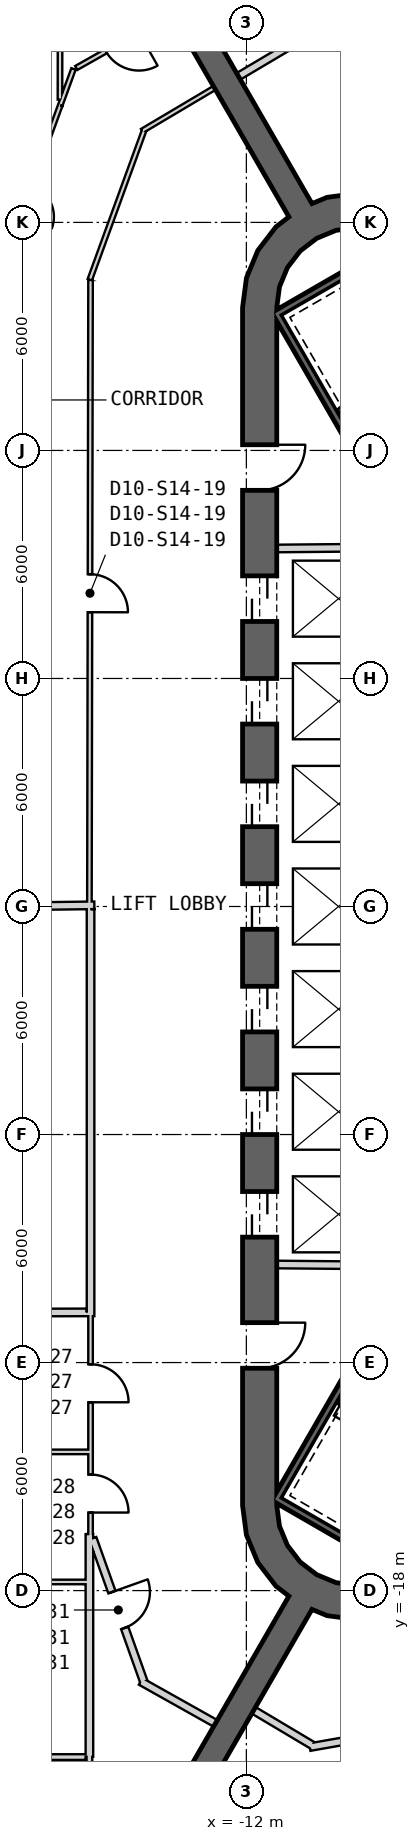
"""IFC4 building model, lengths in metres.
Left out: names, types, materials, properties, quantities, classifications, styles, units other than length and angle.
Written with IfcOpenShell. Run it as: python <this file> out.ifc"""

import sys

from ifc_helpers import new_model, si_unit, direction, frame, frame_2d, origin, place, context, subcontext, project, spatial, polyline, rectangle, outline, extrude, element, fill, save


model = new_model("IFC4")
c1 = context("Model", 3, precision=1e-05, world=origin(), true_north=direction((0.0, 1.0)))
c2 = subcontext(c1, "Body", "Model", "MODEL_VIEW")
j1 = project(units=[si_unit("LENGTHUNIT", "METRE"), si_unit("PLANEANGLEUNIT", "RADIAN")], contexts=[c1])
p1 = place(None, origin())
s1 = spatial("IfcSite", under=j1, at=p1, CompositionType="ELEMENT")
p2 = place(p1, origin())
s2 = spatial("IfcBuilding", under=s1, at=p2, CompositionType="ELEMENT")
p3 = place(p2, frame((0.0, 0.0, 229.2)))
s3 = spatial("IfcBuildingStorey", under=s2, at=p3, CompositionType="ELEMENT", Elevation=229.2)
p4 = place(p3, frame((-11.65, 15.762, 0.0), z_axis=(0.0, 0.0, 1.0), x_axis=(0.0, -1.0, 0.0)))
e1 = element("IfcWall", 1, at=p4, inside=s3, PredefinedType="SHEAR", context=c2, shape_type="SweptSolid", body=[
    extrude(rectangle(XDim=31.523, YDim=0.9, at=frame_2d((15.762, 0.0))), origin(), (0.0, 0.0, 1.0), 4.0),
])
p5 = place(p4, frame((7.062, 0.0, 0.0)))
e2 = element("IfcOpeningElement", 2, at=p5, cuts=e1, PredefinedType="OPENING", context=c2, shape_type="SweptSolid", body=[
    extrude(rectangle(XDim=1.2, YDim=2.4, at=frame_2d((0.6, 1.2))), frame((0.0, 0.46, 0.0), z_axis=(0.0, -1.0, 0.0), x_axis=(1.0, 0.0, 0.0)), (0.0, 0.0, 1.0), 0.92),
])
p6 = place(p4, frame((9.762, 0.0, 0.0)))
e3 = element("IfcOpeningElement", 3, at=p6, cuts=e1, PredefinedType="OPENING", context=c2, shape_type="SweptSolid", body=[
    extrude(rectangle(XDim=1.2, YDim=2.4, at=frame_2d((0.6, 1.2))), frame((0.0, 0.46, 0.0), z_axis=(0.0, -1.0, 0.0), x_axis=(1.0, 0.0, 0.0)), (0.0, 0.0, 1.0), 0.92),
])
p7 = place(p4, frame((12.462, 0.0, 0.0)))
e4 = element("IfcOpeningElement", 4, at=p7, cuts=e1, PredefinedType="OPENING", context=c2, shape_type="SweptSolid", body=[
    extrude(rectangle(XDim=1.2, YDim=2.4, at=frame_2d((0.6, 1.2))), frame((0.0, 0.46, 0.0), z_axis=(0.0, -1.0, 0.0), x_axis=(1.0, 0.0, 0.0)), (0.0, 0.0, 1.0), 0.92),
])
p8 = place(p4, frame((15.162, 0.0, 0.0)))
e5 = element("IfcOpeningElement", 5, at=p8, cuts=e1, PredefinedType="OPENING", context=c2, shape_type="SweptSolid", body=[
    extrude(rectangle(XDim=1.2, YDim=2.4, at=frame_2d((0.6, 1.2))), frame((0.0, 0.46, 0.0), z_axis=(0.0, -1.0, 0.0), x_axis=(1.0, 0.0, 0.0)), (0.0, 0.0, 1.0), 0.92),
])
p9 = place(p4, frame((17.862, 0.0, 0.0)))
e6 = element("IfcOpeningElement", 6, at=p9, cuts=e1, PredefinedType="OPENING", context=c2, shape_type="SweptSolid", body=[
    extrude(rectangle(XDim=1.2, YDim=2.4, at=frame_2d((0.6, 1.2))), frame((0.0, 0.46, 0.0), z_axis=(0.0, -1.0, 0.0), x_axis=(1.0, 0.0, 0.0)), (0.0, 0.0, 1.0), 0.92),
])
p10 = place(p4, frame((20.562, 0.0, 0.0)))
e7 = element("IfcOpeningElement", 7, at=p10, cuts=e1, PredefinedType="OPENING", context=c2, shape_type="SweptSolid", body=[
    extrude(rectangle(XDim=1.2, YDim=2.4, at=frame_2d((0.6, 1.2))), frame((0.0, 0.46, 0.0), z_axis=(0.0, -1.0, 0.0), x_axis=(1.0, 0.0, 0.0)), (0.0, 0.0, 1.0), 0.92),
])
p11 = place(p4, frame((23.262, 0.0, 0.0)))
e8 = element("IfcOpeningElement", 8, at=p11, cuts=e1, PredefinedType="OPENING", context=c2, shape_type="SweptSolid", body=[
    extrude(rectangle(XDim=1.2, YDim=2.4, at=frame_2d((0.6, 1.2))), frame((0.0, 0.46, 0.0), z_axis=(0.0, -1.0, 0.0), x_axis=(1.0, 0.0, 0.0)), (0.0, 0.0, 1.0), 0.92),
])
p12 = place(p4, frame((3.612, 0.0, 0.0)))
e9 = element("IfcOpeningElement", 9, at=p12, cuts=e1, PredefinedType="OPENING", context=c2, shape_type="SweptSolid", body=[
    extrude(rectangle(XDim=1.2, YDim=2.4, at=frame_2d((0.6, 1.2))), frame((0.0, 0.46, 0.0), z_axis=(0.0, -1.0, 0.0), x_axis=(1.0, 0.0, 0.0)), (0.0, 0.0, 1.0), 0.92),
])
p13 = place(p4, frame((26.712, 0.0, 0.0)))
e10 = element("IfcOpeningElement", 10, at=p13, cuts=e1, PredefinedType="OPENING", context=c2, shape_type="SweptSolid", body=[
    extrude(rectangle(XDim=1.2, YDim=2.4, at=frame_2d((0.6, 1.2))), frame((0.0, 0.46, 0.0), z_axis=(0.0, -1.0, 0.0), x_axis=(1.0, 0.0, 0.0)), (0.0, 0.0, 1.0), 0.92),
])
p14 = place(p3, origin())
e11 = element("IfcWall", 11, at=p14, inside=s3, PredefinedType="SHEAR", context=c2, shape_type="SweptSolid", body=[
    extrude(outline(polyline([(-7.6, 18.36), (-8.323, 18.659), (-9.1, 18.762), (-9.876, 18.659), (-10.6, 18.36), (-11.221, 17.883), (-11.698, 17.262), (-11.998, 16.538), (-12.1, 15.762), (-11.2, 15.762), (-11.128, 16.305), (-10.919, 16.812), (-10.585, 17.247), (-10.15, 17.58), (-9.644, 17.79), (-9.1, 17.862), (-8.556, 17.79), (-8.05, 17.58), (-7.6, 18.36)])), origin(), (0.0, 0.0, 1.0), 4.0),
])
p15 = place(p3, origin())
e12 = element("IfcWall", 12, at=p15, inside=s3, PredefinedType="SHEAR", context=c2, shape_type="SweptSolid", body=[
    extrude(outline(polyline([(-12.1, -15.762), (-11.998, -16.538), (-11.698, -17.262), (-11.221, -17.883), (-10.6, -18.36), (-9.876, -18.659), (-9.1, -18.762), (-8.323, -18.659), (-7.6, -18.36), (-8.05, -17.58), (-8.556, -17.79), (-9.1, -17.862), (-9.644, -17.79), (-10.15, -17.58), (-10.585, -17.247), (-10.919, -16.812), (-11.128, -16.305), (-11.2, -15.762), (-12.1, -15.762)])), origin(), (0.0, 0.0, 1.0), 4.0),
])
for number, where, z_axis, x_axis in (
    (13, (-10.575, 18.316, 0.0), (0.0, 0.0, 1.0), (-0.5, 0.866, 0.0)),
    (14, (-10.575, -18.316, 0.0), (0.0, 0.0, 1.0), (-0.5, -0.866, 0.0)),
):
    element("IfcWall", number, at=place(p3, frame(where, z_axis=z_axis, x_axis=x_axis)), inside=s3, PredefinedType="SHEAR", context=c2, shape_type="SweptSolid", body=[
        extrude(rectangle(XDim=11.368, YDim=0.7, at=frame_2d((5.684, 0.0))), origin(), (0.0, 0.0, 1.0), 4.0),
    ])
p16 = place(p3, frame((-11.2, 9.42, 0.0), z_axis=(0.0, 0.0, 1.0), x_axis=(0.999957167047, 0.009255488683, 0.0)))
e15 = element("IfcWall", 15, at=p16, inside=s3, PredefinedType="PLUMBINGWALL", context=c2, shape_type="SweptSolid", body=[
    extrude(rectangle(XDim=3.35, YDim=0.2, at=frame_2d((1.675, 0.0))), origin(), (0.0, 0.0, 1.0), 3.7),
])
p17 = place(p3, frame((-8.05, -9.449, 0.0), z_axis=(0.0, 0.0, 1.0), x_axis=(-0.999957467379, 0.009222983926, 0.0)))
e16 = element("IfcWall", 16, at=p17, inside=s3, PredefinedType="PLUMBINGWALL", context=c2, shape_type="SweptSolid", body=[
    extrude(rectangle(XDim=3.15, YDim=0.2, at=frame_2d((1.575, 0.0))), origin(), (0.0, 0.0, 1.0), 3.7),
])
p18 = place(p3, frame((-11.245, 15.678, -0.3), z_axis=(0.0, 0.0, 1.0), x_axis=(0.499977274689, -0.866038523851, 0.0)))
e17 = element("IfcWall", 17, at=p18, inside=s3, PredefinedType="SHEAR", context=c2, shape_type="SweptSolid", body=[
    extrude(rectangle(XDim=8.1, YDim=0.2, at=frame_2d((4.05, 0.0))), origin(), (0.0, 0.0, 1.0), 4.0),
])
for number, where, z_axis, x_axis in (
    (18, (-7.818, 17.541, -0.3), (0.0, 0.0, 1.0), (-0.866, -0.5, 0.0)),
    (19, (-11.282, -15.541, -0.3), (0.0, 0.0, 1.0), (0.866, -0.5, 0.0)),
):
    element("IfcWall", number, at=place(p3, frame(where, z_axis=z_axis, x_axis=x_axis)), inside=s3, PredefinedType="SHEAR", context=c2, shape_type="SweptSolid", body=[
        extrude(rectangle(XDim=3.8, YDim=0.2, at=frame_2d((1.9, 0.0))), origin(), (0.0, 0.0, 1.0), 4.0),
    ])
p19 = place(p3, frame((-7.196, -8.663, -0.3), z_axis=(0.0, 0.0, 1.0), x_axis=(-0.499997992926, -0.866026562566, 0.0)))
e20 = element("IfcWall", 20, at=p19, inside=s3, PredefinedType="SHEAR", context=c2, shape_type="SweptSolid", body=[
    extrude(rectangle(XDim=7.9, YDim=0.2, at=frame_2d((3.95, 0.0))), origin(), (0.0, 0.0, 1.0), 4.0),
])
p20 = place(p3, frame((-12.839, 21.538, 0.0), z_axis=(0.0, 0.0, 1.0), x_axis=(-0.859953000024, -0.510373233771, 0.0)))
e21 = element("IfcWall", 21, at=p20, inside=s3, PredefinedType="PARTITIONING", context=c2, shape_type="SweptSolid", body=[
    extrude(rectangle(XDim=2.215, YDim=0.12, at=frame_2d((1.108, 0.0))), origin(), (0.0, 0.0, 1.0), 3.7),
])
p21 = place(p3, frame((-14.691, 20.419, 0.0), z_axis=(0.0, 0.0, 1.0), x_axis=(-0.342019678743, -0.93969278988, 0.0)))
e22 = element("IfcWall", 22, at=p21, inside=s3, PredefinedType="PARTITIONING", context=c2, shape_type="SweptSolid", body=[
    extrude(rectangle(XDim=4.181, YDim=0.12, at=frame_2d((2.09, 0.0))), origin(), (0.0, 0.0, 1.0), 2.78),
])
p22 = place(p3, frame((-16.1, 16.486, 0.0), z_axis=(0.0, 0.0, 1.0), x_axis=(-0.00180665503, -0.999998367997, 0.0)))
e23 = element("IfcWall", 23, at=p22, inside=s3, PredefinedType="PARTITIONING", context=c2, shape_type="SweptSolid", body=[
    extrude(rectangle(XDim=16.486, YDim=0.12, at=frame_2d((8.243, 0.0))), origin(), (0.0, 0.0, 1.0), 2.88),
])
p23 = place(p22, frame((7.743, 0.0, 0.0)))
e24 = element("IfcOpeningElement", 24, at=p23, cuts=e23, PredefinedType="OPENING", context=c2, shape_type="SweptSolid", body=[
    extrude(rectangle(XDim=1.0, YDim=2.1, at=frame_2d((0.5, 1.05))), frame((0.0, 0.07, 0.0), z_axis=(0.0, -1.0, 0.0), x_axis=(1.0, 0.0, 0.0)), (0.0, 0.0, 1.0), 0.14),
])
p24 = place(p3, frame((-16.1, -10.71, 0.0), z_axis=(0.0, 0.0, 1.0), x_axis=(0.0, -1.0, 0.0)))
e25 = element("IfcWall", 25, at=p24, inside=s3, PredefinedType="PARTITIONING", context=c2, shape_type="SweptSolid", body=[
    extrude(rectangle(XDim=5.803, YDim=0.12, at=frame_2d((2.901, 0.0))), origin(), (0.0, 0.0, 1.0), 2.88),
])
p25 = place(p24, frame((1.335, 0.0, 0.0)))
e26 = element("IfcOpeningElement", 26, at=p25, cuts=e25, PredefinedType="OPENING", context=c2, shape_type="SweptSolid", body=[
    extrude(rectangle(XDim=1.0, YDim=2.1, at=frame_2d((0.5, 1.05))), frame((0.0, 0.07, 0.0), z_axis=(0.0, -1.0, 0.0), x_axis=(1.0, 0.0, 0.0)), (0.0, 0.0, 1.0), 0.14),
])
p26 = place(p24, frame((4.237, 0.0, 0.0)))
e27 = element("IfcOpeningElement", 27, at=p26, cuts=e25, PredefinedType="OPENING", context=c2, shape_type="SweptSolid", body=[
    extrude(rectangle(XDim=1.0, YDim=2.1, at=frame_2d((0.5, 1.05))), frame((0.0, 0.07, 0.0), z_axis=(0.0, -1.0, 0.0), x_axis=(1.0, 0.0, 0.0)), (0.0, 0.0, 1.0), 0.14),
])
p27 = place(p3, frame((-18.5, -0.001, 0.0), z_axis=(0.0, 0.0, 1.0), x_axis=(0.999915662945, 0.012987185857, 0.0)))
e28 = element("IfcWall", 28, at=p27, inside=s3, PredefinedType="PARTITIONING", context=c2, shape_type="SweptSolid", body=[
    extrude(rectangle(XDim=2.5, YDim=0.2, at=frame_2d((1.25, 0.0))), origin(), (0.0, 0.0, 1.0), 3.07),
])
p28 = place(p3, frame((-16.549, 22.039, 0.0), z_axis=(0.0, 0.0, 1.0), x_axis=(-0.34206932631, -0.939674718186, 0.0)))
e29 = element("IfcWall", 29, at=p28, inside=s3, PredefinedType="PARTITIONING", context=c2, shape_type="SweptSolid", body=[
    extrude(rectangle(XDim=1.021, YDim=0.12, at=frame_2d((0.511, 0.0))), origin(), (0.0, 0.0, 1.0), 3.7),
])
p29 = place(p3, frame((-16.898, 21.079, 0.0), z_axis=(0.0, 0.0, 1.0), x_axis=(-0.341879433665, -0.939743822984, 0.0)))
e30 = element("IfcWall", 30, at=p29, inside=s3, PredefinedType="PARTITIONING", context=c2, shape_type="SweptSolid", body=[
    extrude(rectangle(XDim=1.006, YDim=0.12, at=frame_2d((0.503, 0.0))), origin(), (0.0, 0.0, 1.0), 2.78),
])
p30 = place(p3, frame((-13.963, 23.484, 0.0), z_axis=(0.0, 0.0, 1.0), x_axis=(-0.870462007122, -0.49223560838, 0.0)))
e31 = element("IfcWall", 31, at=p30, inside=s3, PredefinedType="PARTITIONING", context=c2, shape_type="SweptSolid", body=[
    extrude(rectangle(XDim=2.887, YDim=0.12, at=frame_2d((1.443, 0.0))), origin(), (0.0, 0.0, 1.0), 3.7),
])
p31 = place(p30, frame((0.993, 0.0, 0.0)))
e32 = element("IfcOpeningElement", 32, at=p31, cuts=e31, PredefinedType="OPENING", context=c2, shape_type="SweptSolid", body=[
    extrude(rectangle(XDim=1.0, YDim=2.1, at=frame_2d((0.5, 1.05))), frame((0.0, 0.07, 0.0), z_axis=(0.0, -1.0, 0.0), x_axis=(1.0, 0.0, 0.0)), (0.0, 0.0, 1.0), 0.14),
])
p32 = place(p3, frame((-14.781, -20.389, 0.0), z_axis=(0.0, 0.0, 1.0), x_axis=(0.871979734391, -0.489541972471, 0.0)))
e33 = element("IfcWall", 33, at=p32, inside=s3, PredefinedType="PARTITIONING", context=c2, shape_type="SweptSolid", body=[
    extrude(rectangle(XDim=2.257, YDim=0.2, at=frame_2d((1.128, 0.0))), origin(), (0.0, 0.0, 1.0), 3.7),
])
p33 = place(p3, frame((-16.042, -16.623, 0.0), z_axis=(0.0, 0.0, 1.0), x_axis=(0.335572111171, -0.942014521228, 0.0)))
e34 = element("IfcWall", 34, at=p33, inside=s3, PredefinedType="PARTITIONING", context=c2, shape_type="SweptSolid", body=[
    extrude(rectangle(XDim=4.007, YDim=0.2, at=frame_2d((2.004, 0.0))), origin(), (0.0, 0.0, 1.0), 2.78),
])
p34 = place(p33, frame((1.504, 0.0, 0.0)))
e35 = element("IfcOpeningElement", 35, at=p34, cuts=e34, PredefinedType="OPENING", context=c2, shape_type="SweptSolid", body=[
    extrude(rectangle(XDim=1.0, YDim=2.1, at=frame_2d((0.5, 1.05))), frame((0.0, 0.11, 0.0), z_axis=(0.0, -1.0, 0.0), x_axis=(1.0, 0.0, 0.0)), (0.0, 0.0, 1.0), 0.22),
])
p35 = place(p3, frame((-16.1, -0.07, 0.0), z_axis=(0.0, 0.0, 1.0), x_axis=(0.0, -1.0, 0.0)))
e36 = element("IfcWall", 36, at=p35, inside=s3, PredefinedType="PARTITIONING", context=c2, shape_type="SweptSolid", body=[
    extrude(rectangle(XDim=10.71, YDim=0.2, at=frame_2d((5.355, 0.0))), origin(), (0.0, 0.0, 1.0), 2.98),
])
p36 = place(p3, frame((-10.265, 22.996, 0.0), z_axis=(0.0, 0.0, 1.0), x_axis=(-0.859934823121, -0.510403859687, 0.0)))
e37 = element("IfcWall", 37, at=p36, inside=s3, PredefinedType="PARTITIONING", context=c2, shape_type="SweptSolid", body=[
    extrude(rectangle(XDim=2.258, YDim=0.2, at=frame_2d((1.129, 0.0))), origin(), (0.0, 0.0, 1.0), 3.7),
])
p37 = place(p3, frame((-6.181, 22.199, 0.0), z_axis=(0.0, 0.0, 1.0), x_axis=(-0.984807544765, 0.17364935869, 0.0)))
e38 = element("IfcWall", 38, at=p37, inside=s3, PredefinedType="PARTITIONING", context=c2, shape_type="SweptSolid", body=[
    extrude(rectangle(XDim=4.199, YDim=0.2, at=frame_2d((2.1, 0.0))), origin(), (0.0, 0.0, 1.0), 2.78),
])
p38 = place(p3, frame((-10.332, -22.118, 0.0), z_axis=(0.0, 0.0, 1.0), x_axis=(0.984805281118, 0.173662195893, 0.0)))
e39 = element("IfcWall", 39, at=p38, inside=s3, PredefinedType="PARTITIONING", context=c2, shape_type="SweptSolid", body=[
    extrude(rectangle(XDim=3.732, YDim=0.2, at=frame_2d((1.866, 0.0))), origin(), (0.0, 0.0, 1.0), 2.78),
])
p39 = place(p3, frame((-11.807, -21.151, 0.0), z_axis=(0.0, 0.0, 1.0), x_axis=(0.859102811579, -0.511803047214, 0.0)))
e40 = element("IfcWall", 40, at=p39, inside=s3, PredefinedType="PARTITIONING", context=c2, shape_type="SweptSolid", body=[
    extrude(rectangle(XDim=1.802, YDim=0.2, at=frame_2d((0.901, 0.0))), origin(), (0.0, 0.0, 1.0), 3.7),
])
p40 = place(p3, frame((-28.654, -10.711, 0.0), z_axis=(0.0, 0.0, 1.0), x_axis=(0.999996949666, 0.002469951104, 0.0)))
e41 = element("IfcWall", 41, at=p40, inside=s3, PredefinedType="PARTITIONING", context=c2, shape_type="SweptSolid", body=[
    extrude(rectangle(XDim=12.454, YDim=0.2, at=frame_2d((6.227, 0.0))), origin(), (0.0, 0.0, 1.0), 2.98),
])
p41 = place(p3, frame((-16.13, -22.373, 0.0), z_axis=(0.0, 0.0, 1.0), x_axis=(0.0, 1.0, 0.0)))
e42 = element("IfcWall", 42, at=p41, inside=s3, PredefinedType="PARTITIONING", context=c2, shape_type="SweptSolid", body=[
    extrude(rectangle(XDim=4.6, YDim=0.2, at=frame_2d((2.3, 0.0))), origin(), (0.0, 0.0, 1.0), 2.78),
])
p42 = place(p3, frame((-16.13, -17.773, 0.0), z_axis=(0.0, 0.0, 1.0), x_axis=(0.0, 1.0, 0.0)))
e43 = element("IfcWall", 43, at=p42, inside=s3, PredefinedType="PARTITIONING", context=c2, shape_type="SweptSolid", body=[
    extrude(rectangle(XDim=1.26, YDim=0.2, at=frame_2d((0.63, 0.0))), origin(), (0.0, 0.0, 1.0), 3.7),
])
p43 = place(p3, frame((-16.13, -25.745, 0.0), z_axis=(0.0, 0.0, 1.0), x_axis=(0.0, 1.0, 0.0)))
e44 = element("IfcWall", 44, at=p43, inside=s3, PredefinedType="PLUMBINGWALL", context=c2, shape_type="SweptSolid", body=[
    extrude(rectangle(XDim=3.372, YDim=0.15, at=frame_2d((1.686, 0.0))), origin(), (0.0, 0.0, 1.0), 3.7),
])
p44 = place(p3, frame((-16.905, 21.23, 0.0), z_axis=(0.0, 0.0, 1.0), x_axis=(0.001474466813, 0.999998912973, 0.0)))
e45 = element("IfcWall", 45, at=p44, inside=s3, PredefinedType="PARTITIONING", context=c2, shape_type="SweptSolid", body=[
    extrude(rectangle(XDim=3.146, YDim=0.12, at=frame_2d((1.573, 0.0))), origin(), (0.0, 0.0, 1.0), 3.7),
])
p45 = place(p3, frame((-23.59, -14.351, 0.0), z_axis=(0.0, 0.0, 1.0), x_axis=(1.0, 0.0, 0.0)))
e46 = element("IfcWall", 46, at=p45, inside=s3, PredefinedType="PARTITIONING", context=c2, shape_type="SweptSolid", body=[
    extrude(rectangle(XDim=7.46, YDim=0.12, at=frame_2d((3.73, 0.0))), origin(), (0.0, 0.0, 1.0), 3.7),
])
p46 = place(p3, frame((-16.23, -17.773, 0.0), z_axis=(0.0, 0.0, 1.0), x_axis=(-1.0, 0.0, 0.0)))
e47 = element("IfcWall", 47, at=p46, inside=s3, PredefinedType="PARTITIONING", context=c2, shape_type="SweptSolid", body=[
    extrude(rectangle(XDim=7.36, YDim=0.12, at=frame_2d((3.68, 0.0))), origin(), (0.0, 0.0, 1.0), 2.88),
])
p47 = place(p3, frame((-23.59, -22.38, 0.0), z_axis=(0.0, 0.0, 1.0), x_axis=(1.0, 0.0, 0.0)))
e48 = element("IfcWall", 48, at=p47, inside=s3, PredefinedType="PLUMBINGWALL", context=c2, shape_type="SweptSolid", body=[
    extrude(rectangle(XDim=7.36, YDim=0.15, at=frame_2d((3.68, 0.0))), origin(), (0.0, 0.0, 1.0), 2.78),
])
p48 = place(p23, origin())
e49 = element("IfcDoor", 49, at=p48, inside=s3, OperationType="SINGLE_SWING_RIGHT", PredefinedType="NOTDEFINED", context=c2, shape_type="SweptSolid", body=[
    extrude(rectangle(XDim=1.0, YDim=2.1, at=frame_2d((0.5, 1.05))), frame((0.0, 0.025, 0.0), z_axis=(0.0, -1.0, 0.0), x_axis=(1.0, 0.0, 0.0)), (0.0, 0.0, 1.0), 0.05),
])
fill(e24, e49)
p49 = place(p31, origin())
e50 = element("IfcDoor", 50, at=p49, inside=s3, OperationType="SINGLE_SWING_LEFT", PredefinedType="NOTDEFINED", context=c2, shape_type="SweptSolid", body=[
    extrude(rectangle(XDim=1.0, YDim=2.1, at=frame_2d((0.5, 1.05))), frame((0.0, 0.025, 0.0), z_axis=(0.0, -1.0, 0.0), x_axis=(1.0, 0.0, 0.0)), (0.0, 0.0, 1.0), 0.05),
])
fill(e32, e50)
p50 = place(p25, origin())
e51 = element("IfcDoor", 51, at=p50, inside=s3, OperationType="SINGLE_SWING_LEFT", PredefinedType="NOTDEFINED", context=c2, shape_type="SweptSolid", body=[
    extrude(rectangle(XDim=1.0, YDim=2.1, at=frame_2d((0.5, 1.05))), frame((0.0, 0.025, 0.0), z_axis=(0.0, -1.0, 0.0), x_axis=(1.0, 0.0, 0.0)), (0.0, 0.0, 1.0), 0.05),
])
fill(e26, e51)
p51 = place(p26, origin())
e52 = element("IfcDoor", 52, at=p51, inside=s3, OperationType="SINGLE_SWING_RIGHT", PredefinedType="NOTDEFINED", context=c2, shape_type="SweptSolid", body=[
    extrude(rectangle(XDim=1.0, YDim=2.1, at=frame_2d((0.5, 1.05))), frame((0.0, 0.025, 0.0), z_axis=(0.0, -1.0, 0.0), x_axis=(1.0, 0.0, 0.0)), (0.0, 0.0, 1.0), 0.05),
])
fill(e27, e52)
p52 = place(p34, origin())
e53 = element("IfcDoor", 53, at=p52, inside=s3, OperationType="SINGLE_SWING_LEFT", PredefinedType="USERDEFINED", context=c2, shape_type="SweptSolid", body=[
    extrude(rectangle(XDim=1.0, YDim=2.1, at=frame_2d((0.5, 1.05))), frame((0.0, 0.025, 0.0), z_axis=(0.0, -1.0, 0.0), x_axis=(1.0, 0.0, 0.0)), (0.0, 0.0, 1.0), 0.05),
])
fill(e35, e53)
p53 = place(p5, origin())
e54 = element("IfcDoor", 54, at=p53, inside=s3, OperationType="SLIDING_TO_LEFT", PredefinedType="USERDEFINED", context=c2, shape_type="SweptSolid", body=[
    extrude(rectangle(XDim=1.2, YDim=2.4, at=frame_2d((0.6, 1.2))), frame((0.0, 0.025, 0.0), z_axis=(0.0, -1.0, 0.0), x_axis=(1.0, 0.0, 0.0)), (0.0, 0.0, 1.0), 0.05),
])
fill(e2, e54)
p54 = place(p6, origin())
e55 = element("IfcDoor", 55, at=p54, inside=s3, OperationType="SLIDING_TO_LEFT", PredefinedType="USERDEFINED", context=c2, shape_type="SweptSolid", body=[
    extrude(rectangle(XDim=1.2, YDim=2.4, at=frame_2d((0.6, 1.2))), frame((0.0, 0.025, 0.0), z_axis=(0.0, -1.0, 0.0), x_axis=(1.0, 0.0, 0.0)), (0.0, 0.0, 1.0), 0.05),
])
fill(e3, e55)
p55 = place(p7, origin())
e56 = element("IfcDoor", 56, at=p55, inside=s3, OperationType="SLIDING_TO_LEFT", PredefinedType="USERDEFINED", context=c2, shape_type="SweptSolid", body=[
    extrude(rectangle(XDim=1.2, YDim=2.4, at=frame_2d((0.6, 1.2))), frame((0.0, 0.025, 0.0), z_axis=(0.0, -1.0, 0.0), x_axis=(1.0, 0.0, 0.0)), (0.0, 0.0, 1.0), 0.05),
])
fill(e4, e56)
p56 = place(p8, origin())
e57 = element("IfcDoor", 57, at=p56, inside=s3, OperationType="SLIDING_TO_LEFT", PredefinedType="USERDEFINED", context=c2, shape_type="SweptSolid", body=[
    extrude(rectangle(XDim=1.2, YDim=2.4, at=frame_2d((0.6, 1.2))), frame((0.0, 0.025, 0.0), z_axis=(0.0, -1.0, 0.0), x_axis=(1.0, 0.0, 0.0)), (0.0, 0.0, 1.0), 0.05),
])
fill(e5, e57)
p57 = place(p9, origin())
e58 = element("IfcDoor", 58, at=p57, inside=s3, OperationType="SLIDING_TO_LEFT", PredefinedType="USERDEFINED", context=c2, shape_type="SweptSolid", body=[
    extrude(rectangle(XDim=1.2, YDim=2.4, at=frame_2d((0.6, 1.2))), frame((0.0, 0.025, 0.0), z_axis=(0.0, -1.0, 0.0), x_axis=(1.0, 0.0, 0.0)), (0.0, 0.0, 1.0), 0.05),
])
fill(e6, e58)
p58 = place(p10, origin())
e59 = element("IfcDoor", 59, at=p58, inside=s3, OperationType="SLIDING_TO_LEFT", PredefinedType="USERDEFINED", context=c2, shape_type="SweptSolid", body=[
    extrude(rectangle(XDim=1.2, YDim=2.4, at=frame_2d((0.6, 1.2))), frame((0.0, 0.025, 0.0), z_axis=(0.0, -1.0, 0.0), x_axis=(1.0, 0.0, 0.0)), (0.0, 0.0, 1.0), 0.05),
])
fill(e7, e59)
p59 = place(p11, origin())
e60 = element("IfcDoor", 60, at=p59, inside=s3, OperationType="SLIDING_TO_LEFT", PredefinedType="USERDEFINED", context=c2, shape_type="SweptSolid", body=[
    extrude(rectangle(XDim=1.2, YDim=2.4, at=frame_2d((0.6, 1.2))), frame((0.0, 0.025, 0.0), z_axis=(0.0, -1.0, 0.0), x_axis=(1.0, 0.0, 0.0)), (0.0, 0.0, 1.0), 0.05),
])
fill(e8, e60)
p60 = place(p12, origin())
e61 = element("IfcDoor", 61, at=p60, inside=s3, OperationType="SINGLE_SWING_RIGHT", PredefinedType="USERDEFINED", context=c2, shape_type="SweptSolid", body=[
    extrude(rectangle(XDim=1.2, YDim=2.4, at=frame_2d((0.6, 1.2))), frame((0.0, 0.025, 0.0), z_axis=(0.0, -1.0, 0.0), x_axis=(1.0, 0.0, 0.0)), (0.0, 0.0, 1.0), 0.05),
])
fill(e9, e61)
p61 = place(p13, origin())
e62 = element("IfcDoor", 62, at=p61, inside=s3, OperationType="SINGLE_SWING_RIGHT", PredefinedType="USERDEFINED", context=c2, shape_type="SweptSolid", body=[
    extrude(rectangle(XDim=1.2, YDim=2.4, at=frame_2d((0.6, 1.2))), frame((0.0, 0.025, 0.0), z_axis=(0.0, -1.0, 0.0), x_axis=(1.0, 0.0, 0.0)), (0.0, 0.0, 1.0), 0.05),
])
fill(e10, e62)
save(model, sys.argv[1])
